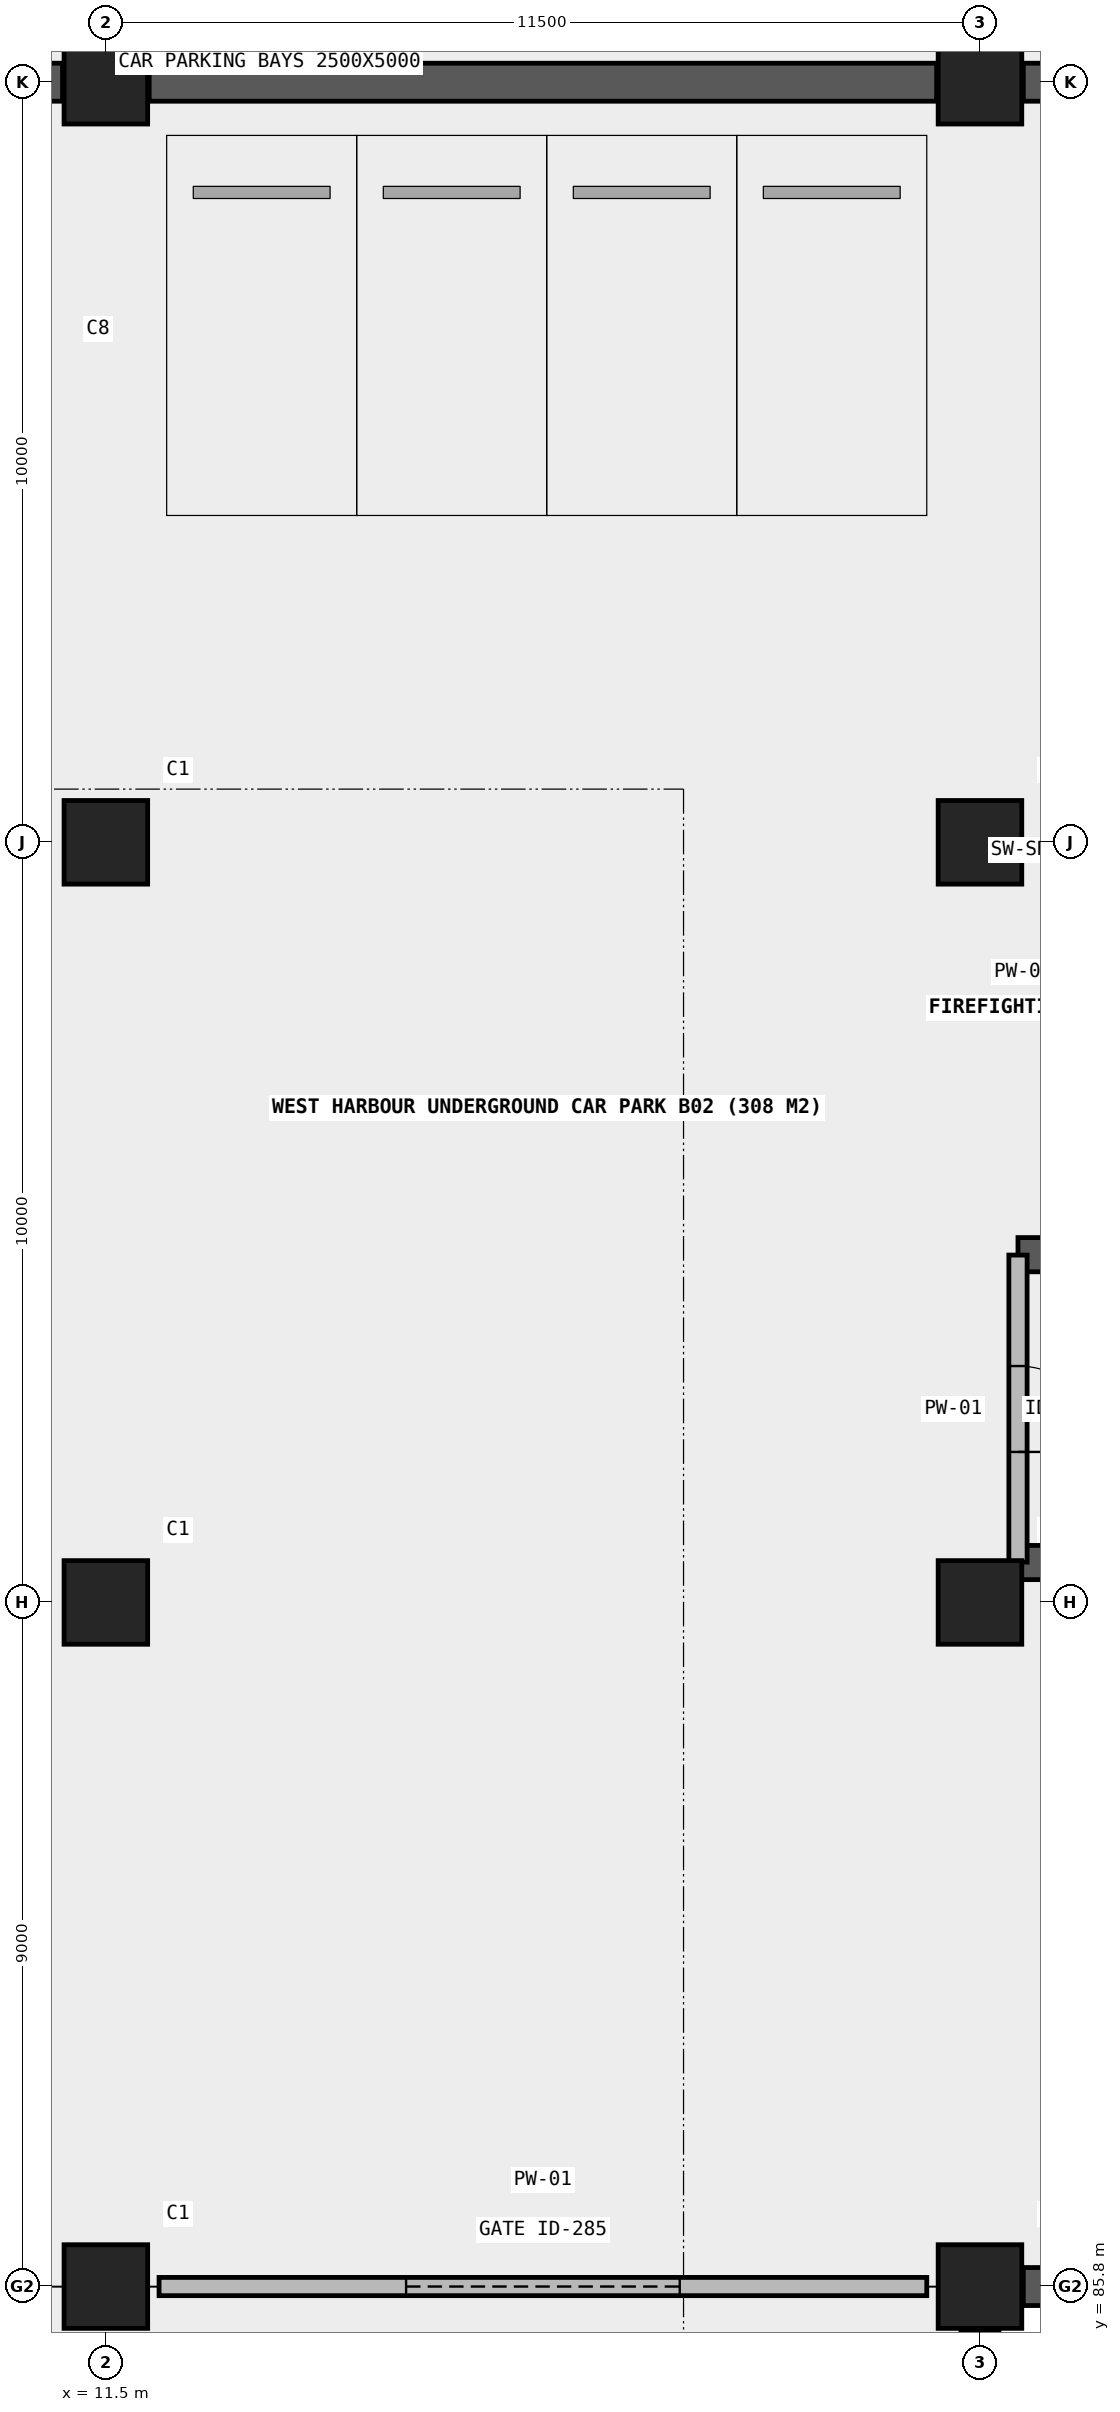
"""IFC4 building model, lengths in metres.
Left out: names, types, materials, properties, quantities, classifications, styles, units other than length and angle.
Written with IfcOpenShell. Run it as: python <this file> out.ifc"""

import sys

from ifc_helpers import new_model, si_unit, direction, frame, frame_2d, origin, origin_2d, place, context, subcontext, project, spatial, rectangle, extrude, element, fill, save


model = new_model("IFC4")
c1 = context("Model", 3, precision=1e-05, world=origin(), true_north=direction((0.0, 1.0)))
c2 = subcontext(c1, "Body", "Model", "MODEL_VIEW")
j1 = project(units=[si_unit("LENGTHUNIT", "METRE"), si_unit("PLANEANGLEUNIT", "RADIAN")], contexts=[c1])
p1 = place(None, origin())
s1 = spatial("IfcSite", under=j1, at=p1, CompositionType="ELEMENT")
p2 = place(p1, origin())
s2 = spatial("IfcBuilding", under=s1, at=p2, CompositionType="ELEMENT")
p3 = place(p2, frame((0.0, 0.0, -8.4)))
s3 = spatial("IfcBuildingStorey", under=s2, at=p3, CompositionType="ELEMENT", Elevation=-8.4)
for number, where, z_axis, x_axis in (
    (1, (11.5, 85.8, 0.0), (0.0, 0.0, 1.0), (1.0, 0.0, 0.0)),
    (2, (11.5, 94.8, 0.0), (0.0, 0.0, 1.0), (1.0, 0.0, 0.0)),
    (3, (11.5, 104.8, 0.0), (0.0, 0.0, 1.0), (1.0, 0.0, 0.0)),
    (4, (11.5, 114.8, 0.0), (0.0, 0.0, 1.0), (1.0, 0.0, 0.0)),
    (5, (23.0, 85.8, 0.0), (0.0, 0.0, 1.0), (1.0, 0.0, 0.0)),
    (6, (23.0, 94.8, 0.0), (0.0, 0.0, 1.0), (1.0, 0.0, 0.0)),
    (7, (23.0, 104.8, 0.0), (0.0, 0.0, 1.0), (1.0, 0.0, 0.0)),
    (8, (23.0, 114.8, 0.0), (0.0, 0.0, 1.0), (1.0, 0.0, 0.0)),
):
    element("IfcColumn", number, at=place(p3, frame(where, z_axis=z_axis, x_axis=x_axis)), inside=s3, PredefinedType="COLUMN", context=c2, shape_type="SweptSolid", body=[
        extrude(rectangle(XDim=1.1, YDim=1.1, at=origin_2d()), origin(), (0.0, 0.0, 1.0), 4.2),
    ])
p4 = place(p3, frame((23.0, 78.395, 0.0), z_axis=(0.0, 0.0, 1.0), x_axis=(0.0, 1.0, 0.0)))
e9 = element("IfcWall", 9, at=p4, inside=s3, PredefinedType="SHEAR", context=c2, shape_type="SweptSolid", body=[
    extrude(rectangle(XDim=6.835, YDim=0.5, at=frame_2d((3.417, 0.0))), origin(), (0.0, 0.0, 1.0), 4.2),
])
for number, where, z_axis, x_axis in (
    (10, (23.57, 85.8, 0.0), (0.0, 0.0, 1.0), (1.0, 0.0, 0.0)),
    (11, (0.57, 114.8, 0.0), (0.0, 0.0, 1.0), (1.0, 0.0, 0.0)),
    (12, (12.07, 114.8, 0.0), (0.0, 0.0, 1.0), (1.0, 0.0, 0.0)),
    (13, (23.57, 114.8, 0.0), (0.0, 0.0, 1.0), (1.0, 0.0, 0.0)),
):
    element("IfcWall", number, at=place(p3, frame(where, z_axis=z_axis, x_axis=x_axis)), inside=s3, PredefinedType="SHEAR", context=c2, shape_type="SweptSolid", body=[
        extrude(rectangle(XDim=10.36, YDim=0.5, at=frame_2d((5.18, 0.0))), origin(), (0.0, 0.0, 1.0), 4.2),
    ])
p5 = place(p3, frame((23.5, 95.325, 0.0), z_axis=(0.0, 0.0, 1.0), x_axis=(1.0, 0.0, 0.0)))
e14 = element("IfcWall", 14, at=p5, inside=s3, PredefinedType="SHEAR", context=c2, shape_type="SweptSolid", body=[
    extrude(rectangle(XDim=9.15, YDim=0.45, at=frame_2d((4.575, 0.0))), origin(), (0.0, 0.0, 1.0), 4.2),
])
p6 = place(p3, frame((23.5, 99.375, 0.0), z_axis=(0.0, 0.0, 1.0), x_axis=(1.0, 0.0, 0.0)))
e15 = element("IfcWall", 15, at=p6, inside=s3, PredefinedType="SHEAR", context=c2, shape_type="SweptSolid", body=[
    extrude(rectangle(XDim=9.15, YDim=0.45, at=frame_2d((4.575, 0.0))), origin(), (0.0, 0.0, 1.0), 4.2),
])
p7 = place(p6, frame((0.55, 0.0, 0.0)))
e16 = element("IfcOpeningElement", 16, at=p7, cuts=e15, PredefinedType="OPENING", context=c2, shape_type="SweptSolid", body=[
    extrude(rectangle(XDim=1.13, YDim=2.15, at=frame_2d((0.565, 1.075))), frame((0.0, 0.235, 0.0), z_axis=(0.0, -1.0, 0.0), x_axis=(1.0, 0.0, 0.0)), (0.0, 0.0, 1.0), 0.47),
])
p8 = place(p3, frame((23.5, 95.33, 0.0), z_axis=(0.0, 0.0, 1.0), x_axis=(0.0, 1.0, 0.0)))
e17 = element("IfcWall", 17, at=p8, inside=s3, PredefinedType="SOLIDWALL", context=c2, shape_type="SweptSolid", body=[
    extrude(rectangle(XDim=4.04, YDim=0.24, at=frame_2d((2.02, 0.0))), origin(), (0.0, 0.0, 1.0), 3.9),
])
p9 = place(p8, frame((1.45, 0.0, 0.0)))
e18 = element("IfcOpeningElement", 18, at=p9, cuts=e17, PredefinedType="OPENING", context=c2, shape_type="SweptSolid", body=[
    extrude(rectangle(XDim=1.13, YDim=2.15, at=frame_2d((0.565, 1.075))), frame((0.0, 0.13, 0.0), z_axis=(0.0, -1.0, 0.0), x_axis=(1.0, 0.0, 0.0)), (0.0, 0.0, 1.0), 0.26),
])
p10 = place(p3, frame((12.2, 85.8, 0.0), z_axis=(0.0, 0.0, 1.0), x_axis=(1.0, 0.0, 0.0)))
e19 = element("IfcWall", 19, at=p10, inside=s3, PredefinedType="SOLIDWALL", context=c2, shape_type="SweptSolid", body=[
    extrude(rectangle(XDim=10.1, YDim=0.24, at=frame_2d((5.05, 0.0))), origin(), (0.0, 0.0, 1.0), 3.12),
])
p11 = place(p10, frame((3.25, 0.0, 0.0)))
e20 = element("IfcOpeningElement", 20, at=p11, cuts=e19, PredefinedType="OPENING", context=c2, shape_type="SweptSolid", body=[
    extrude(rectangle(XDim=3.6, YDim=2.8, at=frame_2d((1.8, 1.4))), frame((0.0, 0.13, 0.0), z_axis=(0.0, -1.0, 0.0), x_axis=(1.0, 0.0, 0.0)), (0.0, 0.0, 1.0), 0.26),
])
p12 = place(p9, frame((0.565, 0.0, 0.0), z_axis=(0.0, 0.0, 1.0), x_axis=(-1.0, 0.0, 0.0)))
e21 = element("IfcDoor", 21, at=p12, inside=s3, OperationType="SINGLE_SWING_LEFT", PredefinedType="DOOR", context=c2, shape_type="SweptSolid", body=[
    extrude(rectangle(XDim=1.13, YDim=2.15, at=frame_2d((0.0, 1.075))), frame((0.0, 0.025, 0.0), z_axis=(0.0, -1.0, 0.0), x_axis=(1.0, 0.0, 0.0)), (0.0, 0.0, 1.0), 0.05),
])
fill(e18, e21)
p13 = place(p11, origin())
e22 = element("IfcDoor", 22, at=p13, inside=s3, OperationType="ROLLINGUP", PredefinedType="GATE", context=c2, shape_type="SweptSolid", body=[
    extrude(rectangle(XDim=3.6, YDim=2.8, at=frame_2d((1.8, 1.4))), frame((0.0, 0.025, 0.0), z_axis=(0.0, -1.0, 0.0), x_axis=(1.0, 0.0, 0.0)), (0.0, 0.0, 1.0), 0.05),
])
fill(e20, e22)
save(model, sys.argv[1])
